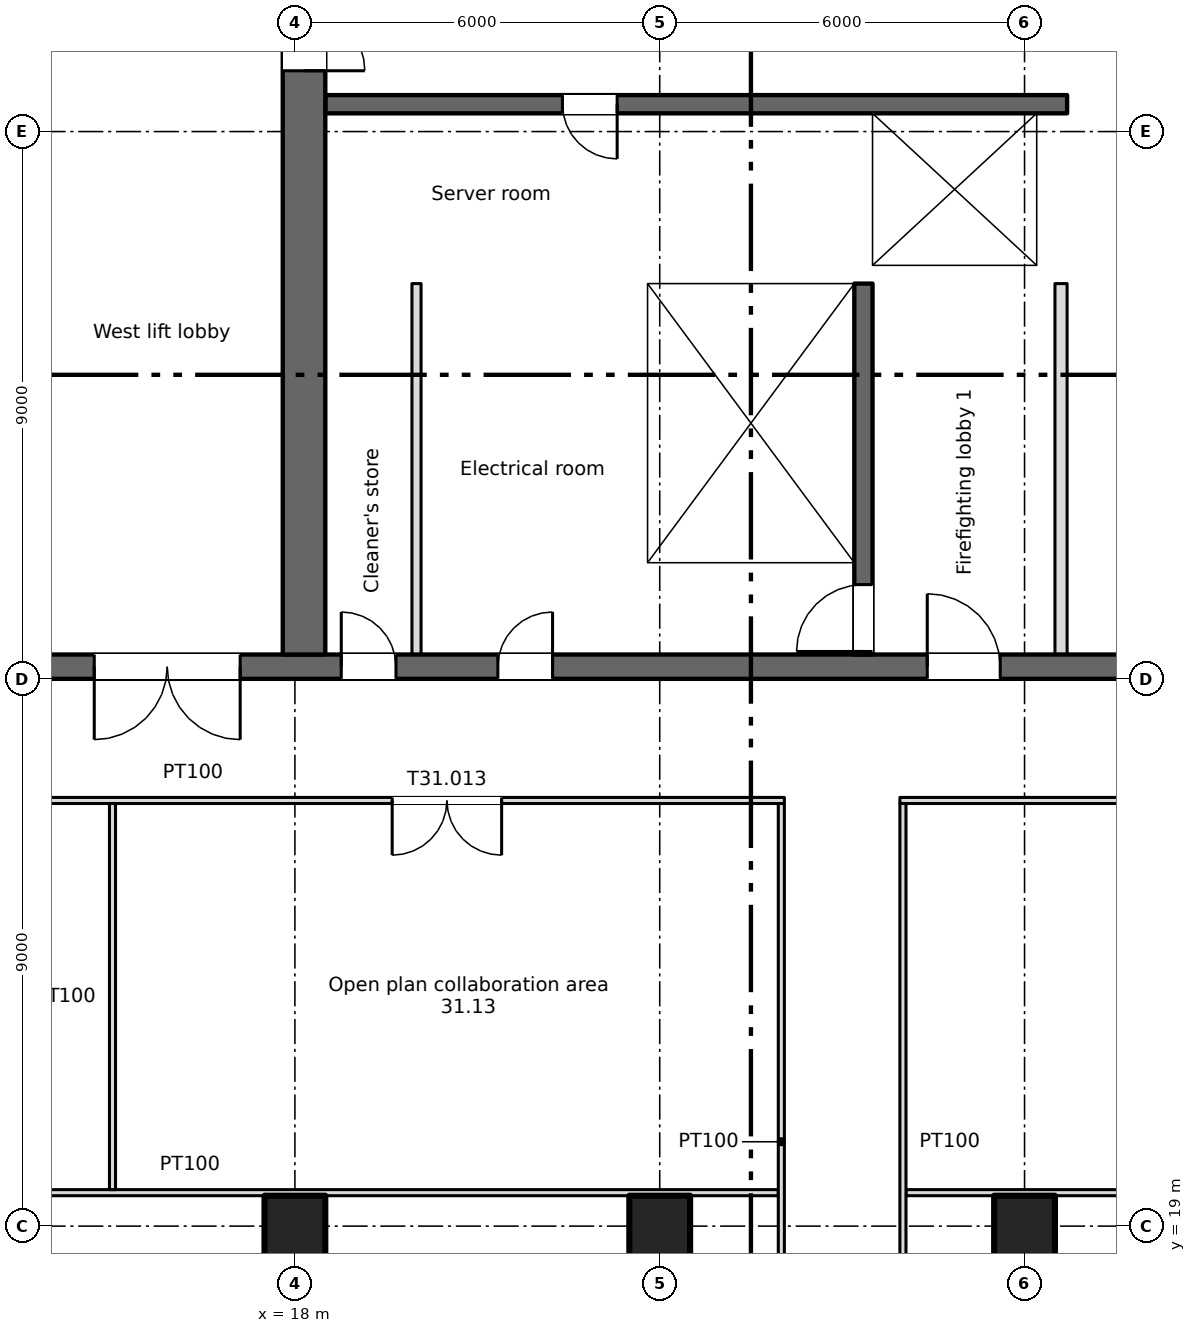
"""IFC4 building model, lengths in metres.
Left out: names, types, materials, properties, quantities, classifications, styles, units other than length and angle.
Written with IfcOpenShell. Run it as: python <this file> out.ifc"""

import sys

from ifc_helpers import new_model, si_unit, direction, frame, frame_2d, origin, origin_2d, place, context, subcontext, project, spatial, rectangle, extrude, element, fill, save


model = new_model("IFC4")
c1 = context("Model", 3, precision=1e-05, world=origin(), true_north=direction((0.0, 1.0)))
c2 = subcontext(c1, "Body", "Model", "MODEL_VIEW")
j1 = project(units=[si_unit("LENGTHUNIT", "METRE"), si_unit("PLANEANGLEUNIT", "RADIAN")], contexts=[c1])
p1 = place(None, origin())
s1 = spatial("IfcSite", under=j1, at=p1, CompositionType="ELEMENT")
p2 = place(p1, origin())
s2 = spatial("IfcBuilding", under=s1, at=p2, CompositionType="ELEMENT")
p3 = place(p2, frame((0.0, 0.0, 215.5)))
s3 = spatial("IfcBuildingStorey", under=s2, at=p3, CompositionType="ELEMENT", Elevation=215.5)
for number, where, z_axis, x_axis in (
    (1, (18.0, 19.0, 0.0), (0.0, 0.0, 1.0), (1.0, 0.0, 0.0)),
    (2, (24.0, 19.0, 0.0), (0.0, 0.0, 1.0), (1.0, 0.0, 0.0)),
    (3, (30.0, 19.0, 0.0), (0.0, 0.0, 1.0), (1.0, 0.0, 0.0)),
):
    element("IfcColumn", number, at=place(p3, frame(where, z_axis=z_axis, x_axis=x_axis)), inside=s3, PredefinedType="COLUMN", context=c2, shape_type="SweptSolid", body=[
        extrude(rectangle(XDim=1.0, YDim=1.0, at=origin_2d()), origin(), (0.0, 0.0, 1.0), 3.35),
    ])
p4 = place(p3, frame((6.6, 28.2, 0.0), z_axis=(0.0, 0.0, 1.0), x_axis=(1.0, 0.0, 0.0)))
e4 = element("IfcWall", 4, at=p4, inside=s3, PredefinedType="SHEAR", context=c2, shape_type="SweptSolid", body=[
    extrude(rectangle(XDim=57.9, YDim=0.4, at=frame_2d((28.95, 0.0))), origin(), (0.0, 0.0, 1.0), 3.35),
])
p5 = place(p4, frame((12.163, 0.0, 0.0)))
e5 = element("IfcOpeningElement", 5, at=p5, cuts=e4, PredefinedType="OPENING", context=c2, shape_type="SweptSolid", body=[
    extrude(rectangle(XDim=0.9, YDim=2.1, at=frame_2d((0.45, 1.05))), frame((0.0, 0.21, 0.0), z_axis=(0.0, -1.0, 0.0), x_axis=(1.0, 0.0, 0.0)), (0.0, 0.0, 1.0), 0.42),
])
p6 = place(p4, frame((14.738, 0.0, 0.0)))
e6 = element("IfcOpeningElement", 6, at=p6, cuts=e4, PredefinedType="OPENING", context=c2, shape_type="SweptSolid", body=[
    extrude(rectangle(XDim=0.9, YDim=2.1, at=frame_2d((0.45, 1.05))), frame((0.0, 0.21, 0.0), z_axis=(0.0, -1.0, 0.0), x_axis=(1.0, 0.0, 0.0)), (0.0, 0.0, 1.0), 0.42),
])
p7 = place(p4, frame((49.163, 0.0, 0.0)))
e7 = element("IfcOpeningElement", 7, at=p7, cuts=e4, PredefinedType="OPENING", context=c2, shape_type="SweptSolid", body=[
    extrude(rectangle(XDim=0.9, YDim=2.1, at=frame_2d((0.45, 1.05))), frame((0.0, 0.21, 0.0), z_axis=(0.0, -1.0, 0.0), x_axis=(1.0, 0.0, 0.0)), (0.0, 0.0, 1.0), 0.42),
])
p8 = place(p4, frame((51.738, 0.0, 0.0)))
e8 = element("IfcOpeningElement", 8, at=p8, cuts=e4, PredefinedType="OPENING", context=c2, shape_type="SweptSolid", body=[
    extrude(rectangle(XDim=0.9, YDim=2.1, at=frame_2d((0.45, 1.05))), frame((0.0, 0.21, 0.0), z_axis=(0.0, -1.0, 0.0), x_axis=(1.0, 0.0, 0.0)), (0.0, 0.0, 1.0), 0.42),
])
p9 = place(p4, frame((1.45, 0.0, 0.0)))
e9 = element("IfcOpeningElement", 9, at=p9, cuts=e4, PredefinedType="OPENING", context=c2, shape_type="SweptSolid", body=[
    extrude(rectangle(XDim=0.9, YDim=2.1, at=frame_2d((0.45, 1.05))), frame((0.0, 0.21, 0.0), z_axis=(0.0, -1.0, 0.0), x_axis=(1.0, 0.0, 0.0)), (0.0, 0.0, 1.0), 0.42),
])
p10 = place(p4, frame((4.8, 0.0, 0.0)))
e10 = element("IfcOpeningElement", 10, at=p10, cuts=e4, PredefinedType="OPENING", context=c2, shape_type="SweptSolid", body=[
    extrude(rectangle(XDim=1.2, YDim=2.1, at=frame_2d((0.6, 1.05))), frame((0.0, 0.21, 0.0), z_axis=(0.0, -1.0, 0.0), x_axis=(1.0, 0.0, 0.0)), (0.0, 0.0, 1.0), 0.42),
])
p11 = place(p4, frame((31.8, 0.0, 0.0)))
e11 = element("IfcOpeningElement", 11, at=p11, cuts=e4, PredefinedType="OPENING", context=c2, shape_type="SweptSolid", body=[
    extrude(rectangle(XDim=1.2, YDim=2.1, at=frame_2d((0.6, 1.05))), frame((0.0, 0.21, 0.0), z_axis=(0.0, -1.0, 0.0), x_axis=(1.0, 0.0, 0.0)), (0.0, 0.0, 1.0), 0.42),
])
p12 = place(p4, frame((55.3, 0.0, 0.0)))
e12 = element("IfcOpeningElement", 12, at=p12, cuts=e4, PredefinedType="OPENING", context=c2, shape_type="SweptSolid", body=[
    extrude(rectangle(XDim=1.2, YDim=2.1, at=frame_2d((0.6, 1.05))), frame((0.0, 0.21, 0.0), z_axis=(0.0, -1.0, 0.0), x_axis=(1.0, 0.0, 0.0)), (0.0, 0.0, 1.0), 0.42),
])
p13 = place(p4, frame((21.8, 0.0, 0.0)))
e13 = element("IfcOpeningElement", 13, at=p13, cuts=e4, PredefinedType="OPENING", context=c2, shape_type="SweptSolid", body=[
    extrude(rectangle(XDim=1.2, YDim=2.1, at=frame_2d((0.6, 1.05))), frame((0.0, 0.21, 0.0), z_axis=(0.0, -1.0, 0.0), x_axis=(1.0, 0.0, 0.0)), (0.0, 0.0, 1.0), 0.42),
])
p14 = place(p4, frame((41.8, 0.0, 0.0)))
e14 = element("IfcOpeningElement", 14, at=p14, cuts=e4, PredefinedType="OPENING", context=c2, shape_type="SweptSolid", body=[
    extrude(rectangle(XDim=1.2, YDim=2.1, at=frame_2d((0.6, 1.05))), frame((0.0, 0.21, 0.0), z_axis=(0.0, -1.0, 0.0), x_axis=(1.0, 0.0, 0.0)), (0.0, 0.0, 1.0), 0.42),
])
p15 = place(p4, frame((24.95, 0.0, 0.0)))
e15 = element("IfcOpeningElement", 15, at=p15, cuts=e4, PredefinedType="OPENING", context=c2, shape_type="SweptSolid", body=[
    extrude(rectangle(XDim=2.4, YDim=2.1, at=frame_2d((1.2, 1.05))), frame((0.0, 0.21, 0.0), z_axis=(0.0, -1.0, 0.0), x_axis=(1.0, 0.0, 0.0)), (0.0, 0.0, 1.0), 0.42),
])
p16 = place(p4, frame((37.45, 0.0, 0.0)))
e16 = element("IfcOpeningElement", 16, at=p16, cuts=e4, PredefinedType="OPENING", context=c2, shape_type="SweptSolid", body=[
    extrude(rectangle(XDim=2.4, YDim=2.1, at=frame_2d((1.2, 1.05))), frame((0.0, 0.21, 0.0), z_axis=(0.0, -1.0, 0.0), x_axis=(1.0, 0.0, 0.0)), (0.0, 0.0, 1.0), 0.42),
])
p17 = place(p4, frame((8.1, 0.0, 0.0)))
e17 = element("IfcOpeningElement", 17, at=p17, cuts=e4, PredefinedType="OPENING", context=c2, shape_type="SweptSolid", body=[
    extrude(rectangle(XDim=2.4, YDim=2.1, at=frame_2d((1.2, 1.05))), frame((0.0, 0.21, 0.0), z_axis=(0.0, -1.0, 0.0), x_axis=(1.0, 0.0, 0.0)), (0.0, 0.0, 1.0), 0.42),
])
p18 = place(p4, frame((28.95, 0.0, 0.0)))
e18 = element("IfcOpeningElement", 18, at=p18, cuts=e4, PredefinedType="OPENING", context=c2, shape_type="SweptSolid", body=[
    extrude(rectangle(XDim=0.9, YDim=2.1, at=frame_2d((0.45, 1.05))), frame((0.0, 0.21, 0.0), z_axis=(0.0, -1.0, 0.0), x_axis=(1.0, 0.0, 0.0)), (0.0, 0.0, 1.0), 0.42),
])
p19 = place(p4, frame((34.95, 0.0, 0.0)))
e19 = element("IfcOpeningElement", 19, at=p19, cuts=e4, PredefinedType="OPENING", context=c2, shape_type="SweptSolid", body=[
    extrude(rectangle(XDim=0.9, YDim=2.1, at=frame_2d((0.45, 1.05))), frame((0.0, 0.21, 0.0), z_axis=(0.0, -1.0, 0.0), x_axis=(1.0, 0.0, 0.0)), (0.0, 0.0, 1.0), 0.42),
])
p20 = place(p3, frame((18.15, 28.4, 0.0), z_axis=(0.0, 0.0, 1.0), x_axis=(0.0, 1.0, 0.0)))
e20 = element("IfcWall", 20, at=p20, inside=s3, PredefinedType="SHEAR", context=c2, shape_type="SweptSolid", body=[
    extrude(rectangle(XDim=16.9, YDim=0.7, at=frame_2d((8.45, 0.0))), origin(), (0.0, 0.0, 1.0), 3.35),
])
p21 = place(p20, frame((9.6, 0.0, 0.0)))
e21 = element("IfcOpeningElement", 21, at=p21, cuts=e20, PredefinedType="OPENING", context=c2, shape_type="SweptSolid", body=[
    extrude(rectangle(XDim=2.0, YDim=2.1, at=frame_2d((1.0, 1.05))), frame((0.0, 0.36, 0.0), z_axis=(0.0, -1.0, 0.0), x_axis=(1.0, 0.0, 0.0)), (0.0, 0.0, 1.0), 0.72),
])
p22 = place(p20, frame((15.4, 0.0, 0.0)))
e22 = element("IfcOpeningElement", 22, at=p22, cuts=e20, PredefinedType="OPENING", context=c2, shape_type="SweptSolid", body=[
    extrude(rectangle(XDim=1.2, YDim=2.1, at=frame_2d((0.6, 1.05))), frame((0.0, 0.36, 0.0), z_axis=(0.0, -1.0, 0.0), x_axis=(1.0, 0.0, 0.0)), (0.0, 0.0, 1.0), 0.72),
])
for number, where, z_axis, x_axis in (
    (23, (13.85, 28.4, 0.0), (0.0, 0.0, 1.0), (0.0, 1.0, 0.0)),
    (24, (23.65, 28.4, 0.0), (0.0, 0.0, 1.0), (0.0, 1.0, 0.0)),
):
    element("IfcWall", number, at=place(p3, frame(where, z_axis=z_axis, x_axis=x_axis)), inside=s3, PredefinedType="SHEAR", context=c2, shape_type="SweptSolid", body=[
        extrude(rectangle(XDim=6.1, YDim=0.3, at=frame_2d((3.05, 0.0))), origin(), (0.0, 0.0, 1.0), 3.35),
    ])
p23 = place(p3, frame((27.35, 28.4, 0.0), z_axis=(0.0, 0.0, 1.0), x_axis=(0.0, 1.0, 0.0)))
e25 = element("IfcWall", 25, at=p23, inside=s3, PredefinedType="SHEAR", context=c2, shape_type="SweptSolid", body=[
    extrude(rectangle(XDim=6.1, YDim=0.3, at=frame_2d((3.05, 0.0))), origin(), (0.0, 0.0, 1.0), 3.35),
])
p24 = place(p23, frame((0.05, 0.0, 0.0)))
e26 = element("IfcOpeningElement", 26, at=p24, cuts=e25, PredefinedType="OPENING", context=c2, shape_type="SweptSolid", body=[
    extrude(rectangle(XDim=1.1, YDim=2.1, at=frame_2d((0.55, 1.05))), frame((0.0, 0.16, 0.0), z_axis=(0.0, -1.0, 0.0), x_axis=(1.0, 0.0, 0.0)), (0.0, 0.0, 1.0), 0.32),
])
p25 = place(p3, frame((18.5, 34.65, 0.0), z_axis=(0.0, 0.0, 1.0), x_axis=(1.0, 0.0, 0.0)))
e27 = element("IfcWall", 27, at=p25, inside=s3, PredefinedType="SHEAR", context=c2, shape_type="SweptSolid", body=[
    extrude(rectangle(XDim=12.2, YDim=0.3, at=frame_2d((6.1, 0.0))), origin(), (0.0, 0.0, 1.0), 3.35),
])
p26 = place(p25, frame((9.8, 0.0, 0.0)))
e28 = element("IfcOpeningElement", 28, at=p26, cuts=e27, PredefinedType="OPENING", context=c2, shape_type="SweptSolid", body=[
    extrude(rectangle(XDim=1.1, YDim=2.1, at=frame_2d((0.55, 1.05))), frame((0.0, 0.16, 0.0), z_axis=(0.0, -1.0, 0.0), x_axis=(1.0, 0.0, 0.0)), (0.0, 0.0, 1.0), 0.32),
])
p27 = place(p3, frame((30.7, 37.45, 0.0), z_axis=(0.0, 0.0, 1.0), x_axis=(-1.0, 0.0, 0.0)))
e29 = element("IfcWall", 29, at=p27, inside=s3, PredefinedType="SHEAR", context=c2, shape_type="SweptSolid", body=[
    extrude(rectangle(XDim=12.2, YDim=0.3, at=frame_2d((6.1, 0.0))), origin(), (0.0, 0.0, 1.0), 3.35),
])
p28 = place(p27, frame((7.4, 0.0, 0.0)))
e30 = element("IfcOpeningElement", 30, at=p28, cuts=e29, PredefinedType="OPENING", context=c2, shape_type="SweptSolid", body=[
    extrude(rectangle(XDim=0.9, YDim=2.1, at=frame_2d((0.45, 1.05))), frame((0.0, 0.16, 0.0), z_axis=(0.0, -1.0, 0.0), x_axis=(1.0, 0.0, 0.0)), (0.0, 0.0, 1.0), 0.32),
])
p29 = place(p3, frame((27.35, 34.8, 0.0), z_axis=(0.0, 0.0, 1.0), x_axis=(0.0, 1.0, 0.0)))
e31 = element("IfcWall", 31, at=p29, inside=s3, PredefinedType="SHEAR", context=c2, shape_type="SweptSolid", body=[
    extrude(rectangle(XDim=2.5, YDim=0.3, at=frame_2d((1.25, 0.0))), origin(), (0.0, 0.0, 1.0), 3.35),
])
p30 = place(p3, frame((30.45, 34.8, 0.0), z_axis=(0.0, 0.0, 1.0), x_axis=(0.0, 1.0, 0.0)))
e32 = element("IfcWall", 32, at=p30, inside=s3, PredefinedType="SHEAR", context=c2, shape_type="SweptSolid", body=[
    extrude(rectangle(XDim=2.5, YDim=0.5, at=frame_2d((1.25, 0.0))), origin(), (0.0, 0.0, 1.0), 3.35),
])
p31 = place(p3, frame((13.85, 34.8, 0.0), z_axis=(0.0, 0.0, 1.0), x_axis=(0.0, 1.0, 0.0)))
e33 = element("IfcWall", 33, at=p31, inside=s3, PredefinedType="SHEAR", context=c2, shape_type="SweptSolid", body=[
    extrude(rectangle(XDim=2.5, YDim=0.3, at=frame_2d((1.25, 0.0))), origin(), (0.0, 0.0, 1.0), 3.35),
])
p32 = place(p3, frame((30.6, 28.4, 0.0), z_axis=(0.0, 0.0, 1.0), x_axis=(0.0, 1.0, 0.0)))
e34 = element("IfcWall", 34, at=p32, inside=s3, PredefinedType="PARTITIONING", context=c2, shape_type="SweptSolid", body=[
    extrude(rectangle(XDim=6.1, YDim=0.2, at=frame_2d((3.05, 0.0))), origin(), (0.0, 0.0, 1.0), 3.35),
])
p33 = place(p3, frame((20.0, 28.4, 0.0), z_axis=(0.0, 0.0, 1.0), x_axis=(0.0, 1.0, 0.0)))
e35 = element("IfcWall", 35, at=p33, inside=s3, PredefinedType="PARTITIONING", context=c2, shape_type="SweptSolid", body=[
    extrude(rectangle(XDim=6.1, YDim=0.15, at=frame_2d((3.05, 0.0))), origin(), (0.0, 0.0, 1.0), 3.35),
])
p34 = place(p3, frame((6.6, 19.55, 0.0), z_axis=(0.0, 0.0, 1.0), x_axis=(1.0, 0.0, 0.0)))
e36 = element("IfcWall", 36, at=p34, inside=s3, PredefinedType="PARTITIONING", context=c2, shape_type="SweptSolid", body=[
    extrude(rectangle(XDim=19.35, YDim=0.1, at=frame_2d((9.675, 0.0))), origin(), (0.0, 0.0, 1.0), 3.35),
])
p35 = place(p3, frame((28.05, 19.55, 0.0), z_axis=(0.0, 0.0, 1.0), x_axis=(1.0, 0.0, 0.0)))
e37 = element("IfcWall", 37, at=p35, inside=s3, PredefinedType="PARTITIONING", context=c2, shape_type="SweptSolid", body=[
    extrude(rectangle(XDim=21.9, YDim=0.1, at=frame_2d((10.95, 0.0))), origin(), (0.0, 0.0, 1.0), 3.35),
])
p36 = place(p3, frame((6.6, 26.0, 0.0), z_axis=(0.0, 0.0, 1.0), x_axis=(1.0, 0.0, 0.0)))
e38 = element("IfcWall", 38, at=p36, inside=s3, PredefinedType="PARTITIONING", context=c2, shape_type="SweptSolid", body=[
    extrude(rectangle(XDim=19.45, YDim=0.1, at=frame_2d((9.725, 0.0))), origin(), (0.0, 0.0, 1.0), 3.35),
])
p37 = place(p36, frame((3.7, 0.0, 0.0)))
e39 = element("IfcOpeningElement", 39, at=p37, cuts=e38, PredefinedType="OPENING", context=c2, shape_type="SweptSolid", body=[
    extrude(rectangle(XDim=1.0, YDim=2.1, at=frame_2d((0.5, 1.05))), frame((0.0, 0.06, 0.0), z_axis=(0.0, -1.0, 0.0), x_axis=(1.0, 0.0, 0.0)), (0.0, 0.0, 1.0), 0.12),
])
p38 = place(p36, frame((13.0, 0.0, 0.0)))
e40 = element("IfcOpeningElement", 40, at=p38, cuts=e38, PredefinedType="OPENING", context=c2, shape_type="SweptSolid", body=[
    extrude(rectangle(XDim=1.8, YDim=2.1, at=frame_2d((0.9, 1.05))), frame((0.0, 0.06, 0.0), z_axis=(0.0, -1.0, 0.0), x_axis=(1.0, 0.0, 0.0)), (0.0, 0.0, 1.0), 0.12),
])
p39 = place(p3, frame((27.95, 26.0, 0.0), z_axis=(0.0, 0.0, 1.0), x_axis=(1.0, 0.0, 0.0)))
e41 = element("IfcWall", 41, at=p39, inside=s3, PredefinedType="PARTITIONING", context=c2, shape_type="SweptSolid", body=[
    extrude(rectangle(XDim=22.1, YDim=0.1, at=frame_2d((11.05, 0.0))), origin(), (0.0, 0.0, 1.0), 3.35),
])
p40 = place(p39, frame((4.65, 0.0, 0.0)))
e42 = element("IfcOpeningElement", 42, at=p40, cuts=e41, PredefinedType="OPENING", context=c2, shape_type="SweptSolid", body=[
    extrude(rectangle(XDim=1.8, YDim=2.1, at=frame_2d((0.9, 1.05))), frame((0.0, 0.06, 0.0), z_axis=(0.0, -1.0, 0.0), x_axis=(1.0, 0.0, 0.0)), (0.0, 0.0, 1.0), 0.12),
])
p41 = place(p39, frame((15.65, 0.0, 0.0)))
e43 = element("IfcOpeningElement", 43, at=p41, cuts=e41, PredefinedType="OPENING", context=c2, shape_type="SweptSolid", body=[
    extrude(rectangle(XDim=1.8, YDim=2.1, at=frame_2d((0.9, 1.05))), frame((0.0, 0.06, 0.0), z_axis=(0.0, -1.0, 0.0), x_axis=(1.0, 0.0, 0.0)), (0.0, 0.0, 1.0), 0.12),
])
p42 = place(p3, frame((15.0, 19.6, 0.0), z_axis=(0.0, 0.0, 1.0), x_axis=(0.0, 1.0, 0.0)))
e44 = element("IfcWall", 44, at=p42, inside=s3, PredefinedType="PARTITIONING", context=c2, shape_type="SweptSolid", body=[
    extrude(rectangle(XDim=6.35, YDim=0.1, at=frame_2d((3.175, 0.0))), origin(), (0.0, 0.0, 1.0), 3.35),
])
for number, where, z_axis, x_axis in (
    (45, (26.0, 12.6, 0.0), (0.0, 0.0, 1.0), (0.0, 1.0, 0.0)),
    (46, (28.0, 12.6, 0.0), (0.0, 0.0, 1.0), (0.0, 1.0, 0.0)),
):
    element("IfcWall", number, at=place(p3, frame(where, z_axis=z_axis, x_axis=x_axis)), inside=s3, PredefinedType="PARTITIONING", context=c2, shape_type="SweptSolid", body=[
        extrude(rectangle(XDim=13.35, YDim=0.1, at=frame_2d((6.675, 0.0))), origin(), (0.0, 0.0, 1.0), 3.35),
    ])
p43 = place(p5, origin())
e47 = element("IfcDoor", 47, at=p43, inside=s3, OperationType="SINGLE_SWING_LEFT", PredefinedType="DOOR", context=c2, shape_type="SweptSolid", body=[
    extrude(rectangle(XDim=0.9, YDim=2.1, at=frame_2d((0.45, 1.05))), frame((0.0, 0.025, 0.0), z_axis=(0.0, -1.0, 0.0), x_axis=(1.0, 0.0, 0.0)), (0.0, 0.0, 1.0), 0.05),
])
fill(e5, e47)
p44 = place(p6, origin())
e48 = element("IfcDoor", 48, at=p44, inside=s3, OperationType="SINGLE_SWING_RIGHT", PredefinedType="DOOR", context=c2, shape_type="SweptSolid", body=[
    extrude(rectangle(XDim=0.9, YDim=2.1, at=frame_2d((0.45, 1.05))), frame((0.0, 0.025, 0.0), z_axis=(0.0, -1.0, 0.0), x_axis=(1.0, 0.0, 0.0)), (0.0, 0.0, 1.0), 0.05),
])
fill(e6, e48)
p45 = place(p28, origin())
e49 = element("IfcDoor", 49, at=p45, inside=s3, OperationType="SINGLE_SWING_LEFT", PredefinedType="DOOR", context=c2, shape_type="SweptSolid", body=[
    extrude(rectangle(XDim=0.9, YDim=2.1, at=frame_2d((0.45, 1.05))), frame((0.0, 0.025, 0.0), z_axis=(0.0, -1.0, 0.0), x_axis=(1.0, 0.0, 0.0)), (0.0, 0.0, 1.0), 0.05),
])
fill(e30, e49)
p46 = place(p26, origin())
e50 = element("IfcDoor", 50, at=p46, inside=s3, OperationType="SLIDING_TO_LEFT", PredefinedType="DOOR", context=c2, shape_type="SweptSolid", body=[
    extrude(rectangle(XDim=1.1, YDim=2.1, at=frame_2d((0.55, 1.05))), frame((0.0, 0.025, 0.0), z_axis=(0.0, -1.0, 0.0), x_axis=(1.0, 0.0, 0.0)), (0.0, 0.0, 1.0), 0.05),
])
fill(e28, e50)
p47 = place(p24, origin())
e51 = element("IfcDoor", 51, at=p47, inside=s3, OperationType="SINGLE_SWING_LEFT", PredefinedType="DOOR", context=c2, shape_type="SweptSolid", body=[
    extrude(rectangle(XDim=1.1, YDim=2.1, at=frame_2d((0.55, 1.05))), frame((0.0, 0.025, 0.0), z_axis=(0.0, -1.0, 0.0), x_axis=(1.0, 0.0, 0.0)), (0.0, 0.0, 1.0), 0.05),
])
fill(e26, e51)
p48 = place(p13, origin())
e52 = element("IfcDoor", 52, at=p48, inside=s3, OperationType="SINGLE_SWING_LEFT", PredefinedType="DOOR", context=c2, shape_type="SweptSolid", body=[
    extrude(rectangle(XDim=1.2, YDim=2.1, at=frame_2d((0.6, 1.05))), frame((0.0, 0.025, 0.0), z_axis=(0.0, -1.0, 0.0), x_axis=(1.0, 0.0, 0.0)), (0.0, 0.0, 1.0), 0.05),
])
fill(e13, e52)
p49 = place(p17, origin())
e53 = element("IfcDoor", 53, at=p49, inside=s3, OperationType="DOUBLE_DOOR_SINGLE_SWING", PredefinedType="DOOR", context=c2, shape_type="SweptSolid", body=[
    extrude(rectangle(XDim=2.4, YDim=2.1, at=frame_2d((1.2, 1.05))), frame((0.0, 0.025, 0.0), z_axis=(0.0, -1.0, 0.0), x_axis=(1.0, 0.0, 0.0)), (0.0, 0.0, 1.0), 0.05),
])
fill(e17, e53)
p50 = place(p21, origin())
e54 = element("IfcDoor", 54, at=p50, inside=s3, OperationType="DOUBLE_DOOR_SINGLE_SWING", PredefinedType="DOOR", context=c2, shape_type="SweptSolid", body=[
    extrude(rectangle(XDim=2.0, YDim=2.1, at=frame_2d((1.0, 1.05))), frame((0.0, 0.025, 0.0), z_axis=(0.0, -1.0, 0.0), x_axis=(1.0, 0.0, 0.0)), (0.0, 0.0, 1.0), 0.05),
])
fill(e21, e54)
p51 = place(p38, origin())
e55 = element("IfcDoor", 55, at=p51, inside=s3, OperationType="DOUBLE_DOOR_SINGLE_SWING", PredefinedType="DOOR", context=c2, shape_type="SweptSolid", body=[
    extrude(rectangle(XDim=1.8, YDim=2.1, at=frame_2d((0.9, 1.05))), frame((0.0, 0.025, 0.0), z_axis=(0.0, -1.0, 0.0), x_axis=(1.0, 0.0, 0.0)), (0.0, 0.0, 1.0), 0.05),
])
fill(e40, e55)
save(model, sys.argv[1])
